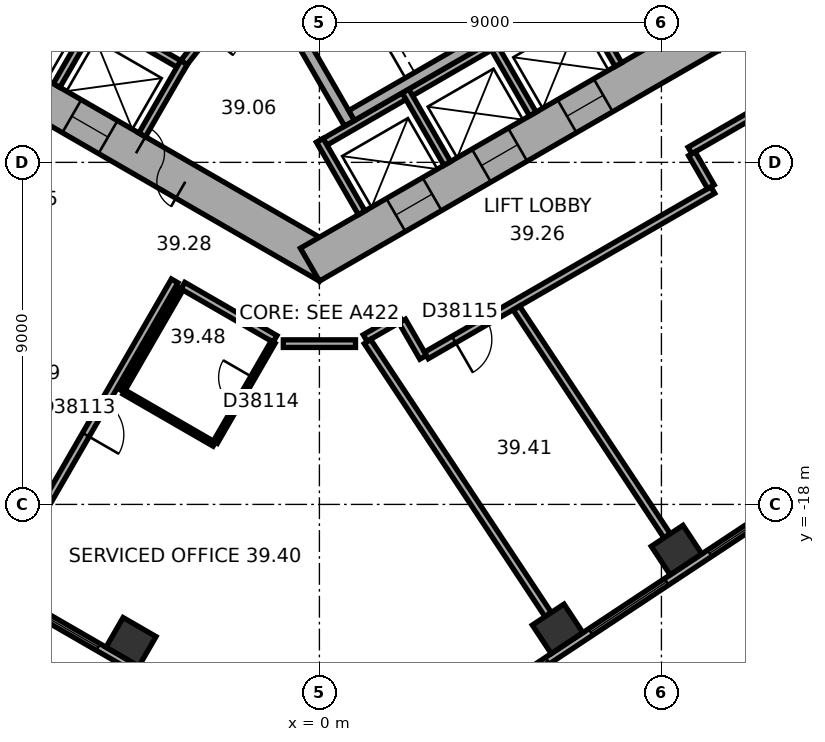
"""IFC4 building model, lengths in metres.
Left out: names, types, materials, properties, quantities, classifications, styles, units other than length and angle.
Written with IfcOpenShell. Run it as: python <this file> out.ifc"""

import sys

from ifc_helpers import new_model, si_unit, direction, frame, frame_2d, origin, origin_2d, place, context, subcontext, project, spatial, rectangle, extrude, element, fill, save


model = new_model("IFC4")
c1 = context("Model", 3, precision=1e-05, world=origin(), true_north=direction((0.0, 1.0)))
c2 = subcontext(c1, "Body", "Model", "MODEL_VIEW")
j1 = project(units=[si_unit("LENGTHUNIT", "METRE"), si_unit("PLANEANGLEUNIT", "RADIAN")], contexts=[c1])
p1 = place(None, origin())
s1 = spatial("IfcSite", under=j1, at=p1, CompositionType="ELEMENT")
p2 = place(p1, origin())
s2 = spatial("IfcBuilding", under=s1, at=p2, CompositionType="ELEMENT")
p3 = place(p2, frame((0.0, 0.0, 161.4)))
s3 = spatial("IfcBuildingStorey", under=s2, at=p3, CompositionType="ELEMENT", Elevation=161.4)
for number, where, z_axis, x_axis in (
    (1, (-4.958, -21.617, 0.0), (0.0, 0.0, 1.0), (0.866, -0.5, 0.0)),
    (2, (6.268, -21.274, 0.0), (0.0, 0.0, 1.0), (0.834, 0.552, 0.0)),
    (3, (9.398, -19.202, 0.0), (0.0, 0.0, 1.0), (0.834, 0.552, 0.0)),
):
    element("IfcColumn", number, at=place(p3, frame(where, z_axis=z_axis, x_axis=x_axis)), inside=s3, PredefinedType="COLUMN", context=c2, shape_type="SweptSolid", body=[
        extrude(rectangle(XDim=1.0, YDim=0.9, at=origin_2d()), origin(), (0.0, 0.0, 1.0), 3.7),
    ])
p4 = place(p3, frame((-10.25, -5.629, 0.0), z_axis=(0.0, 0.0, 1.0), x_axis=(0.866022616891, -0.50000482701, 0.0)))
e4 = element("IfcWall", 4, at=p4, inside=s3, PredefinedType="SHEAR", context=c2, shape_type="SweptSolid", body=[
    extrude(rectangle(XDim=12.125, YDim=1.0, at=frame_2d((6.062, 0.0))), origin(), (0.0, 0.0, 1.0), 3.7),
])
p5 = place(p4, frame((6.262, 0.0, 0.0)))
e5 = element("IfcOpeningElement", 5, at=p5, cuts=e4, PredefinedType="OPENING", context=c2, shape_type="SweptSolid", body=[
    extrude(rectangle(XDim=1.5, YDim=2.1, at=frame_2d((0.75, 1.05))), frame((0.0, 0.51, 0.0), z_axis=(0.0, -1.0, 0.0), x_axis=(1.0, 0.0, 0.0)), (0.0, 0.0, 1.0), 1.02),
])
p6 = place(p4, frame((1.712, 0.0, 0.0)))
e6 = element("IfcOpeningElement", 6, at=p6, cuts=e4, PredefinedType="OPENING", context=c2, shape_type="SweptSolid", body=[
    extrude(rectangle(XDim=1.1, YDim=2.1, at=frame_2d((0.55, 1.05))), frame((0.0, 0.51, 0.0), z_axis=(0.0, -1.0, 0.0), x_axis=(1.0, 0.0, 0.0)), (0.0, 0.0, 1.0), 1.02),
])
p7 = place(p4, frame((4.312, 0.0, 0.0)))
e7 = element("IfcOpeningElement", 7, at=p7, cuts=e4, PredefinedType="OPENING", context=c2, shape_type="SweptSolid", body=[
    extrude(rectangle(XDim=1.1, YDim=2.1, at=frame_2d((0.55, 1.05))), frame((0.0, 0.51, 0.0), z_axis=(0.0, -1.0, 0.0), x_axis=(1.0, 0.0, 0.0)), (0.0, 0.0, 1.0), 1.02),
])
p8 = place(p3, frame((-0.25, -11.691, 0.0), z_axis=(0.0, 0.0, 1.0), x_axis=(0.866022616891, 0.50000482701, 0.0)))
e8 = element("IfcWall", 8, at=p8, inside=s3, PredefinedType="SHEAR", context=c2, shape_type="SweptSolid", body=[
    extrude(rectangle(XDim=12.125, YDim=1.0, at=frame_2d((6.062, 0.0))), origin(), (0.0, 0.0, 1.0), 3.7),
])
p9 = place(p8, frame((2.612, 0.0, 0.0)))
e9 = element("IfcOpeningElement", 9, at=p9, cuts=e8, PredefinedType="OPENING", context=c2, shape_type="SweptSolid", body=[
    extrude(rectangle(XDim=1.1, YDim=2.1, at=frame_2d((0.55, 1.05))), frame((0.0, 0.51, 0.0), z_axis=(0.0, -1.0, 0.0), x_axis=(1.0, 0.0, 0.0)), (0.0, 0.0, 1.0), 1.02),
])
p10 = place(p8, frame((5.212, 0.0, 0.0)))
e10 = element("IfcOpeningElement", 10, at=p10, cuts=e8, PredefinedType="OPENING", context=c2, shape_type="SweptSolid", body=[
    extrude(rectangle(XDim=1.1, YDim=2.1, at=frame_2d((0.55, 1.05))), frame((0.0, 0.51, 0.0), z_axis=(0.0, -1.0, 0.0), x_axis=(1.0, 0.0, 0.0)), (0.0, 0.0, 1.0), 1.02),
])
p11 = place(p8, frame((7.812, 0.0, 0.0)))
e11 = element("IfcOpeningElement", 11, at=p11, cuts=e8, PredefinedType="OPENING", context=c2, shape_type="SweptSolid", body=[
    extrude(rectangle(XDim=1.1, YDim=2.1, at=frame_2d((0.55, 1.05))), frame((0.0, 0.51, 0.0), z_axis=(0.0, -1.0, 0.0), x_axis=(1.0, 0.0, 0.0)), (0.0, 0.0, 1.0), 1.02),
])
p12 = place(p3, frame((-18.789, -14.267, 0.0), z_axis=(0.0, 0.0, 1.0), x_axis=(0.866023315909, -0.500003616288, 0.0)))
e12 = element("IfcWall", 12, at=p12, inside=s3, PredefinedType="STANDARD", context=c2, shape_type="SweptSolid", body=[
    extrude(rectangle(XDim=20.044, YDim=0.2, at=frame_2d((10.022, 0.0))), origin(), (0.0, 0.0, 1.0), 3.7),
])
p13 = place(p12, frame((1.314, 0.0, 0.9)))
e13 = element("IfcOpeningElement", 13, at=p13, cuts=e12, PredefinedType="OPENING", context=c2, shape_type="SweptSolid", body=[
    extrude(rectangle(XDim=2.4, YDim=2.0, at=frame_2d((1.2, 1.0))), frame((0.0, 0.11, 0.0), z_axis=(0.0, -1.0, 0.0), x_axis=(1.0, 0.0, 0.0)), (0.0, 0.0, 1.0), 0.22),
])
p14 = place(p12, frame((5.069, 0.0, 0.9)))
e14 = element("IfcOpeningElement", 14, at=p14, cuts=e12, PredefinedType="OPENING", context=c2, shape_type="SweptSolid", body=[
    extrude(rectangle(XDim=2.4, YDim=2.0, at=frame_2d((1.2, 1.0))), frame((0.0, 0.11, 0.0), z_axis=(0.0, -1.0, 0.0), x_axis=(1.0, 0.0, 0.0)), (0.0, 0.0, 1.0), 0.22),
])
p15 = place(p12, frame((8.823, 0.0, 0.9)))
e15 = element("IfcOpeningElement", 15, at=p15, cuts=e12, PredefinedType="OPENING", context=c2, shape_type="SweptSolid", body=[
    extrude(rectangle(XDim=2.4, YDim=2.0, at=frame_2d((1.2, 1.0))), frame((0.0, 0.11, 0.0), z_axis=(0.0, -1.0, 0.0), x_axis=(1.0, 0.0, 0.0)), (0.0, 0.0, 1.0), 0.22),
])
p16 = place(p12, frame((12.577, 0.0, 0.9)))
e16 = element("IfcOpeningElement", 16, at=p16, cuts=e12, PredefinedType="OPENING", context=c2, shape_type="SweptSolid", body=[
    extrude(rectangle(XDim=2.4, YDim=2.0, at=frame_2d((1.2, 1.0))), frame((0.0, 0.11, 0.0), z_axis=(0.0, -1.0, 0.0), x_axis=(1.0, 0.0, 0.0)), (0.0, 0.0, 1.0), 0.22),
])
p17 = place(p12, frame((16.331, 0.0, 0.9)))
e17 = element("IfcOpeningElement", 17, at=p17, cuts=e12, PredefinedType="OPENING", context=c2, shape_type="SweptSolid", body=[
    extrude(rectangle(XDim=2.4, YDim=2.0, at=frame_2d((1.2, 1.0))), frame((0.0, 0.11, 0.0), z_axis=(0.0, -1.0, 0.0), x_axis=(1.0, 0.0, 0.0)), (0.0, 0.0, 1.0), 0.22),
])
p18 = place(p3, frame((2.911, -24.156, 0.0), z_axis=(0.0, 0.0, 1.0), x_axis=(0.833882163564, 0.551942512668, 0.0)))
e18 = element("IfcWall", 18, at=p18, inside=s3, PredefinedType="STANDARD", context=c2, shape_type="SweptSolid", body=[
    extrude(rectangle(XDim=20.044, YDim=0.2, at=frame_2d((10.022, 0.0))), origin(), (0.0, 0.0, 1.0), 3.7),
])
p19 = place(p18, frame((1.313, 0.0, 0.9)))
e19 = element("IfcOpeningElement", 19, at=p19, cuts=e18, PredefinedType="OPENING", context=c2, shape_type="SweptSolid", body=[
    extrude(rectangle(XDim=2.4, YDim=2.0, at=frame_2d((1.2, 1.0))), frame((0.0, 0.11, 0.0), z_axis=(0.0, -1.0, 0.0), x_axis=(1.0, 0.0, 0.0)), (0.0, 0.0, 1.0), 0.22),
])
p20 = place(p18, frame((5.067, 0.0, 0.9)))
e20 = element("IfcOpeningElement", 20, at=p20, cuts=e18, PredefinedType="OPENING", context=c2, shape_type="SweptSolid", body=[
    extrude(rectangle(XDim=2.4, YDim=2.0, at=frame_2d((1.2, 1.0))), frame((0.0, 0.11, 0.0), z_axis=(0.0, -1.0, 0.0), x_axis=(1.0, 0.0, 0.0)), (0.0, 0.0, 1.0), 0.22),
])
p21 = place(p18, frame((8.821, 0.0, 0.9)))
e21 = element("IfcOpeningElement", 21, at=p21, cuts=e18, PredefinedType="OPENING", context=c2, shape_type="SweptSolid", body=[
    extrude(rectangle(XDim=2.4, YDim=2.0, at=frame_2d((1.2, 1.0))), frame((0.0, 0.11, 0.0), z_axis=(0.0, -1.0, 0.0), x_axis=(1.0, 0.0, 0.0)), (0.0, 0.0, 1.0), 0.22),
])
p22 = place(p18, frame((12.575, 0.0, 0.9)))
e22 = element("IfcOpeningElement", 22, at=p22, cuts=e18, PredefinedType="OPENING", context=c2, shape_type="SweptSolid", body=[
    extrude(rectangle(XDim=2.4, YDim=2.0, at=frame_2d((1.2, 1.0))), frame((0.0, 0.11, 0.0), z_axis=(0.0, -1.0, 0.0), x_axis=(1.0, 0.0, 0.0)), (0.0, 0.0, 1.0), 0.22),
])
p23 = place(p18, frame((16.329, 0.0, 0.9)))
e23 = element("IfcOpeningElement", 23, at=p23, cuts=e18, PredefinedType="OPENING", context=c2, shape_type="SweptSolid", body=[
    extrude(rectangle(XDim=2.4, YDim=2.0, at=frame_2d((1.2, 1.0))), frame((0.0, 0.11, 0.0), z_axis=(0.0, -1.0, 0.0), x_axis=(1.0, 0.0, 0.0)), (0.0, 0.0, 1.0), 0.22),
])
p24 = place(p3, frame((-8.203, -3.809, 0.0), z_axis=(0.0, 0.0, 1.0), x_axis=(0.866028230842, -0.499995103361, 0.0)))
e24 = element("IfcWall", 24, at=p24, inside=s3, PredefinedType="PARTITIONING", context=c2, shape_type="SweptSolid", body=[
    extrude(rectangle(XDim=5.4, YDim=0.2, at=frame_2d((2.7, 0.0))), origin(), (0.0, 0.0, 1.0), 3.42),
])
p25 = place(p3, frame((-5.815, -5.072, 0.0), z_axis=(0.0, 0.0, 1.0), x_axis=(-0.499946605688, -0.86605622881, 0.0)))
e25 = element("IfcWall", 25, at=p25, inside=s3, PredefinedType="PARTITIONING", context=c2, shape_type="SweptSolid", body=[
    extrude(rectangle(XDim=2.2, YDim=0.2, at=frame_2d((1.1, 0.0))), origin(), (0.0, 0.0, 1.0), 3.42),
])
p26 = place(p3, frame((-3.563, -6.372, 0.0), z_axis=(0.0, 0.0, 1.0), x_axis=(-0.499994660107, -0.866028486751, 0.0)))
e26 = element("IfcWall", 26, at=p26, inside=s3, PredefinedType="PARTITIONING", context=c2, shape_type="SweptSolid", body=[
    extrude(rectangle(XDim=2.2, YDim=0.2, at=frame_2d((1.1, 0.0))), origin(), (0.0, 0.0, 1.0), 3.42),
])
p27 = place(p3, frame((-0.024, -8.559, 0.0), z_axis=(0.0, 0.0, 1.0), x_axis=(0.866026010844, 0.49999894854, 0.0)))
e27 = element("IfcWall", 27, at=p27, inside=s3, PredefinedType="PARTITIONING", context=c2, shape_type="SweptSolid", body=[
    extrude(rectangle(XDim=8.0, YDim=0.2, at=frame_2d((4.0, 0.0))), origin(), (0.0, 0.0, 1.0), 3.42),
])
for number, where, z_axis, x_axis in (
    (28, (0.013, -8.422, 0.0), (0.0, 0.0, 1.0), (0.5, -0.866, 0.0)),
    (29, (2.264, -7.122, 0.0), (0.0, 0.0, 1.0), (0.5, -0.866, 0.0)),
    (30, (4.516, -5.822, 0.0), (0.0, 0.0, 1.0), (0.5, -0.866, 0.0)),
    (31, (6.768, -4.522, 0.0), (0.0, 0.0, 1.0), (0.5, -0.866, 0.0)),
):
    element("IfcWall", number, at=place(p3, frame(where, z_axis=z_axis, x_axis=x_axis)), inside=s3, PredefinedType="PARTITIONING", context=c2, shape_type="SweptSolid", body=[
        extrude(rectangle(XDim=2.2, YDim=0.2, at=frame_2d((1.1, 0.0))), origin(), (0.0, 0.0, 1.0), 3.42),
    ])
p28 = place(p3, frame((-1.558, -3.902, 0.0), z_axis=(0.0, 0.0, 1.0), x_axis=(0.499977259774, -0.866038532462, 0.0)))
e32 = element("IfcWall", 32, at=p28, inside=s3, PredefinedType="SHEAR", context=c2, shape_type="SweptSolid", body=[
    extrude(rectangle(XDim=4.7, YDim=0.3, at=frame_2d((2.35, 0.0))), origin(), (0.0, 0.0, 1.0), 3.42),
])
p29 = place(p28, frame((0.8, 0.0, 0.0)))
e33 = element("IfcOpeningElement", 33, at=p29, cuts=e32, PredefinedType="OPENING", context=c2, shape_type="SweptSolid", body=[
    extrude(rectangle(XDim=1.2, YDim=2.1, at=frame_2d((0.6, 1.05))), frame((0.0, 0.16, 0.0), z_axis=(0.0, -1.0, 0.0), x_axis=(1.0, 0.0, 0.0)), (0.0, 0.0, 1.0), 0.32),
])
p30 = place(p3, frame((0.847, -7.767, 0.0), z_axis=(0.0, 0.0, 1.0), x_axis=(0.866027801685, 0.499995846692, 0.0)))
e34 = element("IfcWall", 34, at=p30, inside=s3, PredefinedType="SHEAR", context=c2, shape_type="SweptSolid", body=[
    extrude(rectangle(XDim=7.06, YDim=0.3, at=frame_2d((3.53, 0.0))), origin(), (0.0, 0.0, 1.0), 3.42),
])
p31 = place(p3, frame((-1.712, -4.008, 0.0), z_axis=(0.0, 0.0, 1.0), x_axis=(-0.616549420702, -0.787316208287, 0.0)))
e35 = element("IfcWall", 35, at=p31, inside=s3, PredefinedType="PARTITIONING", context=c2, shape_type="SweptSolid", body=[
    extrude(rectangle(XDim=3.002, YDim=0.2, at=frame_2d((1.501, 0.0))), origin(), (0.0, 0.0, 1.0), 3.42),
])
p32 = place(p31, frame((1.15, 0.0, 0.0)))
e36 = element("IfcOpeningElement", 36, at=p32, cuts=e35, PredefinedType="OPENING", context=c2, shape_type="SweptSolid", body=[
    extrude(rectangle(XDim=0.9, YDim=2.1, at=frame_2d((0.45, 1.05))), frame((0.0, 0.11, 0.0), z_axis=(0.0, -1.0, 0.0), x_axis=(1.0, 0.0, 0.0)), (0.0, 0.0, 1.0), 0.22),
])
p33 = place(p3, frame((-7.984, -19.351, 0.0), z_axis=(0.0, 0.0, 1.0), x_axis=(0.500010139422, 0.866019549707, 0.0)))
e37 = element("IfcWall", 37, at=p33, inside=s3, PredefinedType="PARTITIONING", context=c2, shape_type="SweptSolid", body=[
    extrude(rectangle(XDim=8.35, YDim=0.2, at=frame_2d((4.175, 0.0))), origin(), (0.0, 0.0, 1.0), 3.42),
])
p34 = place(p33, frame((3.675, 0.0, 0.0)))
e38 = element("IfcOpeningElement", 38, at=p34, cuts=e37, PredefinedType="OPENING", context=c2, shape_type="SweptSolid", body=[
    extrude(rectangle(XDim=1.0, YDim=2.1, at=frame_2d((0.5, 1.05))), frame((0.0, 0.11, 0.0), z_axis=(0.0, -1.0, 0.0), x_axis=(1.0, 0.0, 0.0)), (0.0, 0.0, 1.0), 0.22),
])
p35 = place(p3, frame((-5.192, -15.016, 0.0), z_axis=(0.0, 0.0, 1.0), x_axis=(0.500026960575, 0.86600983753, 0.0)))
e39 = element("IfcWall", 39, at=p35, inside=s3, PredefinedType="PARTITIONING", context=c2, shape_type="SweptSolid", body=[
    extrude(rectangle(XDim=3.1, YDim=0.12, at=frame_2d((1.55, 0.0))), origin(), (0.0, 0.0, 1.0), 3.42),
])
p36 = place(p3, frame((-3.592, -12.244, 0.0), z_axis=(0.0, 0.0, 1.0), x_axis=(0.866034573852, -0.49998411664, 0.0)))
e40 = element("IfcWall", 40, at=p36, inside=s3, PredefinedType="PARTITIONING", context=c2, shape_type="SweptSolid", body=[
    extrude(rectangle(XDim=2.8, YDim=0.2, at=frame_2d((1.4, 0.0))), origin(), (0.0, 0.0, 1.0), 3.42),
])
p37 = place(p3, frame((-2.767, -16.416, 0.0), z_axis=(0.0, 0.0, 1.0), x_axis=(-0.865997131366, 0.500048966069, 0.0)))
e41 = element("IfcWall", 41, at=p37, inside=s3, PredefinedType="PARTITIONING", context=c2, shape_type="SweptSolid", body=[
    extrude(rectangle(XDim=2.74, YDim=0.12, at=frame_2d((1.37, 0.0))), origin(), (0.0, 0.0, 1.0), 3.42),
])
p38 = place(p3, frame((-1.217, -13.731, 0.0), z_axis=(0.0, 0.0, 1.0), x_axis=(-0.499991248344, -0.866030456496, 0.0)))
e42 = element("IfcWall", 42, at=p38, inside=s3, PredefinedType="PARTITIONING", context=c2, shape_type="SweptSolid", body=[
    extrude(rectangle(XDim=3.04, YDim=0.12, at=frame_2d((1.52, 0.0))), origin(), (0.0, 0.0, 1.0), 3.42),
])
p39 = place(p38, frame((1.07, 0.0, 0.0)))
e43 = element("IfcOpeningElement", 43, at=p39, cuts=e42, PredefinedType="OPENING", context=c2, shape_type="SweptSolid", body=[
    extrude(rectangle(XDim=0.9, YDim=2.1, at=frame_2d((0.45, 1.05))), frame((0.0, 0.07, 0.0), z_axis=(0.0, -1.0, 0.0), x_axis=(1.0, 0.0, 0.0)), (0.0, 0.0, 1.0), 0.14),
])
p40 = place(p3, frame((-0.95, -13.77, 0.0), z_axis=(0.0, 0.0, 1.0), x_axis=(1.0, 0.0, 0.0)))
e44 = element("IfcWall", 44, at=p40, inside=s3, PredefinedType="PARTITIONING", context=c2, shape_type="SweptSolid", body=[
    extrude(rectangle(XDim=1.9, YDim=0.2, at=frame_2d((0.95, 0.0))), origin(), (0.0, 0.0, 1.0), 3.42),
])
p41 = place(p3, frame((1.204, -13.623, 0.0), z_axis=(0.0, 0.0, 1.0), x_axis=(0.866040989419, 0.499973003918, 0.0)))
e45 = element("IfcWall", 45, at=p41, inside=s3, PredefinedType="PARTITIONING", context=c2, shape_type="SweptSolid", body=[
    extrude(rectangle(XDim=1.068, YDim=0.2, at=frame_2d((0.534, 0.0))), origin(), (0.0, 0.0, 1.0), 3.42),
])
p42 = place(p3, frame((2.179, -13.176, 0.0), z_axis=(0.0, 0.0, 1.0), x_axis=(0.499978356969, -0.866037899034, 0.0)))
e46 = element("IfcWall", 46, at=p42, inside=s3, PredefinedType="PARTITIONING", context=c2, shape_type="SweptSolid", body=[
    extrude(rectangle(XDim=1.101, YDim=0.2, at=frame_2d((0.551, 0.0))), origin(), (0.0, 0.0, 1.0), 3.42),
])
p43 = place(p3, frame((2.816, -14.079, 0.0), z_axis=(0.0, 0.0, 1.0), x_axis=(0.866021128829, 0.500007404367, 0.0)))
e47 = element("IfcWall", 47, at=p43, inside=s3, PredefinedType="PARTITIONING", context=c2, shape_type="SweptSolid", body=[
    extrude(rectangle(XDim=8.702, YDim=0.2, at=frame_2d((4.351, 0.0))), origin(), (0.0, 0.0, 1.0), 3.42),
])
p44 = place(p43, frame((0.833, 0.0, 0.0)))
e48 = element("IfcOpeningElement", 48, at=p44, cuts=e47, PredefinedType="OPENING", context=c2, shape_type="SweptSolid", body=[
    extrude(rectangle(XDim=1.0, YDim=2.1, at=frame_2d((0.5, 1.05))), frame((0.0, 0.11, 0.0), z_axis=(0.0, -1.0, 0.0), x_axis=(1.0, 0.0, 0.0)), (0.0, 0.0, 1.0), 0.22),
])
p45 = place(p3, frame((6.02, -20.899, 0.0), z_axis=(0.0, 0.0, 1.0), x_axis=(-0.551943990108, 0.833881185651, 0.0)))
e49 = element("IfcWall", 49, at=p45, inside=s3, PredefinedType="PARTITIONING", context=c2, shape_type="SweptSolid", body=[
    extrude(rectangle(XDim=8.615, YDim=0.2, at=frame_2d((4.308, 0.0))), origin(), (0.0, 0.0, 1.0), 3.42),
])
p46 = place(p3, frame((9.15, -18.827, 0.0), z_axis=(0.0, 0.0, 1.0), x_axis=(-0.551928083938, 0.83389171369, 0.0)))
e50 = element("IfcWall", 50, at=p46, inside=s3, PredefinedType="PARTITIONING", context=c2, shape_type="SweptSolid", body=[
    extrude(rectangle(XDim=7.182, YDim=0.2, at=frame_2d((3.591, 0.0))), origin(), (0.0, 0.0, 1.0), 2.87),
])
p47 = place(p3, frame((9.752, -8.688, 0.0), z_axis=(0.0, 0.0, 1.0), x_axis=(0.865974105138, 0.500088841337, 0.0)))
e51 = element("IfcWall", 51, at=p47, inside=s3, PredefinedType="PARTITIONING", context=c2, shape_type="SweptSolid", body=[
    extrude(rectangle(XDim=1.961, YDim=0.2, at=frame_2d((0.98, 0.0))), origin(), (0.0, 0.0, 1.0), 3.42),
])
p48 = place(p3, frame((10.302, -9.642, 0.0), z_axis=(0.0, 0.0, 1.0), x_axis=(-0.500074377092, 0.865982457891, 0.0)))
e52 = element("IfcWall", 52, at=p48, inside=s3, PredefinedType="PARTITIONING", context=c2, shape_type="SweptSolid", body=[
    extrude(rectangle(XDim=1.001, YDim=0.2, at=frame_2d((0.5, 0.0))), origin(), (0.0, 0.0, 1.0), 3.42),
])
p49 = place(p16, origin())
e53 = element("IfcWindow", 53, at=p49, inside=s3, PartitioningType="SINGLE_PANEL", PredefinedType="WINDOW", context=c2, shape_type="SweptSolid", body=[
    extrude(rectangle(XDim=2.4, YDim=2.0, at=frame_2d((1.2, 1.0))), frame((0.0, 0.03, 0.0), z_axis=(0.0, -1.0, 0.0), x_axis=(1.0, 0.0, 0.0)), (0.0, 0.0, 1.0), 0.06),
])
fill(e16, e53)
p50 = place(p19, origin())
e54 = element("IfcWindow", 54, at=p50, inside=s3, PartitioningType="SINGLE_PANEL", PredefinedType="WINDOW", context=c2, shape_type="SweptSolid", body=[
    extrude(rectangle(XDim=2.4, YDim=2.0, at=frame_2d((1.2, 1.0))), frame((0.0, 0.03, 0.0), z_axis=(0.0, -1.0, 0.0), x_axis=(1.0, 0.0, 0.0)), (0.0, 0.0, 1.0), 0.06),
])
fill(e19, e54)
p51 = place(p20, origin())
e55 = element("IfcWindow", 55, at=p51, inside=s3, PartitioningType="SINGLE_PANEL", PredefinedType="WINDOW", context=c2, shape_type="SweptSolid", body=[
    extrude(rectangle(XDim=2.4, YDim=2.0, at=frame_2d((1.2, 1.0))), frame((0.0, 0.03, 0.0), z_axis=(0.0, -1.0, 0.0), x_axis=(1.0, 0.0, 0.0)), (0.0, 0.0, 1.0), 0.06),
])
fill(e20, e55)
p52 = place(p21, origin())
e56 = element("IfcWindow", 56, at=p52, inside=s3, PartitioningType="SINGLE_PANEL", PredefinedType="WINDOW", context=c2, shape_type="SweptSolid", body=[
    extrude(rectangle(XDim=2.4, YDim=2.0, at=frame_2d((1.2, 1.0))), frame((0.0, 0.03, 0.0), z_axis=(0.0, -1.0, 0.0), x_axis=(1.0, 0.0, 0.0)), (0.0, 0.0, 1.0), 0.06),
])
fill(e21, e56)
p53 = place(p5, origin())
e57 = element("IfcDoor", 57, at=p53, inside=s3, OperationType="DOUBLE_DOOR_SINGLE_SWING", PredefinedType="DOOR", context=c2, shape_type="SweptSolid", body=[
    extrude(rectangle(XDim=1.5, YDim=2.1, at=frame_2d((0.75, 1.05))), frame((0.0, 0.025, 0.0), z_axis=(0.0, -1.0, 0.0), x_axis=(1.0, 0.0, 0.0)), (0.0, 0.0, 1.0), 0.05),
])
fill(e5, e57)
p54 = place(p7, origin())
e58 = element("IfcDoor", 58, at=p54, inside=s3, OperationType="DOUBLE_DOOR_SLIDING", PredefinedType="DOOR", context=c2, shape_type="SweptSolid", body=[
    extrude(rectangle(XDim=1.1, YDim=2.1, at=frame_2d((0.55, 1.05))), frame((0.0, 0.025, 0.0), z_axis=(0.0, -1.0, 0.0), x_axis=(1.0, 0.0, 0.0)), (0.0, 0.0, 1.0), 0.05),
])
fill(e7, e58)
p55 = place(p9, origin())
e59 = element("IfcDoor", 59, at=p55, inside=s3, OperationType="DOUBLE_DOOR_SLIDING", PredefinedType="DOOR", context=c2, shape_type="SweptSolid", body=[
    extrude(rectangle(XDim=1.1, YDim=2.1, at=frame_2d((0.55, 1.05))), frame((0.0, 0.025, 0.0), z_axis=(0.0, -1.0, 0.0), x_axis=(1.0, 0.0, 0.0)), (0.0, 0.0, 1.0), 0.05),
])
fill(e9, e59)
p56 = place(p10, origin())
e60 = element("IfcDoor", 60, at=p56, inside=s3, OperationType="DOUBLE_DOOR_SLIDING", PredefinedType="DOOR", context=c2, shape_type="SweptSolid", body=[
    extrude(rectangle(XDim=1.1, YDim=2.1, at=frame_2d((0.55, 1.05))), frame((0.0, 0.025, 0.0), z_axis=(0.0, -1.0, 0.0), x_axis=(1.0, 0.0, 0.0)), (0.0, 0.0, 1.0), 0.05),
])
fill(e10, e60)
p57 = place(p11, origin())
e61 = element("IfcDoor", 61, at=p57, inside=s3, OperationType="DOUBLE_DOOR_SLIDING", PredefinedType="DOOR", context=c2, shape_type="SweptSolid", body=[
    extrude(rectangle(XDim=1.1, YDim=2.1, at=frame_2d((0.55, 1.05))), frame((0.0, 0.025, 0.0), z_axis=(0.0, -1.0, 0.0), x_axis=(1.0, 0.0, 0.0)), (0.0, 0.0, 1.0), 0.05),
])
fill(e11, e61)
p58 = place(p34, origin())
e62 = element("IfcDoor", 62, at=p58, inside=s3, OperationType="SINGLE_SWING_LEFT", PredefinedType="DOOR", context=c2, shape_type="SweptSolid", body=[
    extrude(rectangle(XDim=1.0, YDim=2.1, at=frame_2d((0.5, 1.05))), frame((0.0, 0.025, 0.0), z_axis=(0.0, -1.0, 0.0), x_axis=(1.0, 0.0, 0.0)), (0.0, 0.0, 1.0), 0.05),
])
fill(e38, e62)
p59 = place(p39, origin())
e63 = element("IfcDoor", 63, at=p59, inside=s3, OperationType="SINGLE_SWING_LEFT", PredefinedType="DOOR", context=c2, shape_type="SweptSolid", body=[
    extrude(rectangle(XDim=0.9, YDim=2.1, at=frame_2d((0.45, 1.05))), frame((0.0, 0.025, 0.0), z_axis=(0.0, -1.0, 0.0), x_axis=(1.0, 0.0, 0.0)), (0.0, 0.0, 1.0), 0.05),
])
fill(e43, e63)
p60 = place(p44, origin())
e64 = element("IfcDoor", 64, at=p60, inside=s3, OperationType="SINGLE_SWING_LEFT", PredefinedType="DOOR", context=c2, shape_type="SweptSolid", body=[
    extrude(rectangle(XDim=1.0, YDim=2.1, at=frame_2d((0.5, 1.05))), frame((0.0, 0.025, 0.0), z_axis=(0.0, -1.0, 0.0), x_axis=(1.0, 0.0, 0.0)), (0.0, 0.0, 1.0), 0.05),
])
fill(e48, e64)
save(model, sys.argv[1])
